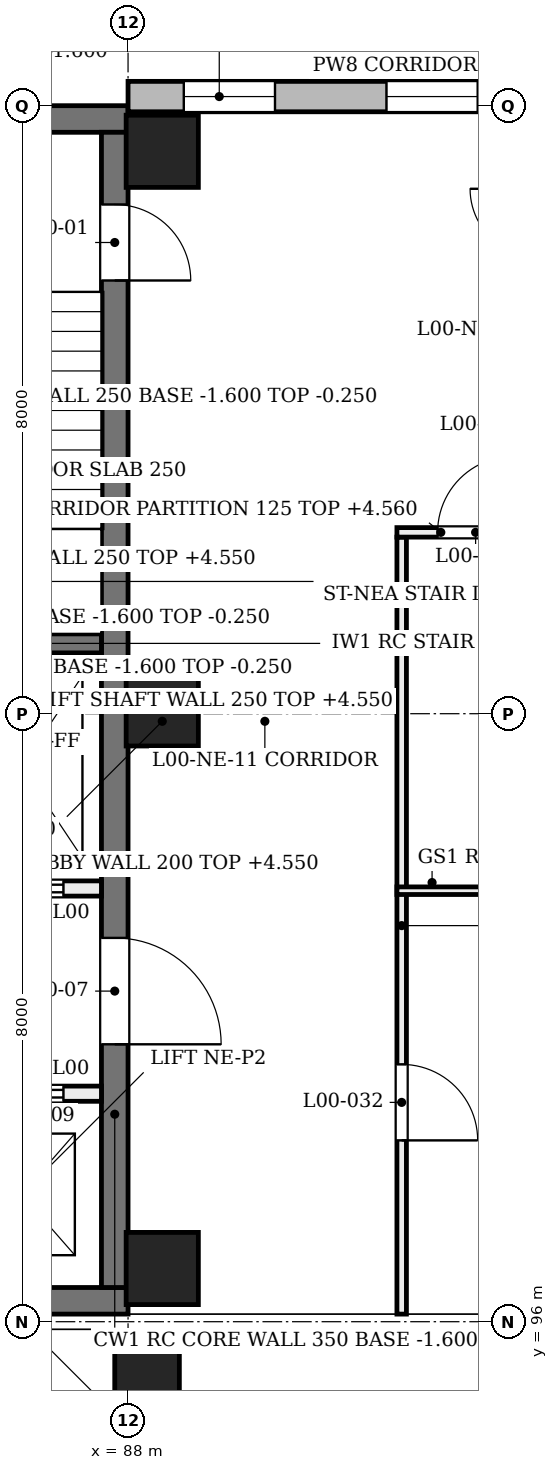
"""IFC4 building model, lengths in metres.
Left out: names, types, materials, properties, quantities, classifications, styles, units other than length and angle.
Written with IfcOpenShell. Run it as: python <this file> out.ifc"""

import sys

from ifc_helpers import new_model, si_unit, direction, frame, frame_2d, origin, origin_2d, place, context, subcontext, project, spatial, rectangle, extrude, element, fill, save


model = new_model("IFC4")
c1 = context("Model", 3, precision=1e-05, world=origin(), true_north=direction((0.0, 1.0)))
c2 = subcontext(c1, "Body", "Model", "MODEL_VIEW")
j1 = project(units=[si_unit("LENGTHUNIT", "METRE"), si_unit("PLANEANGLEUNIT", "RADIAN")], contexts=[c1])
p1 = place(None, origin())
s1 = spatial("IfcSite", under=j1, at=p1, CompositionType="ELEMENT")
p2 = place(p1, origin())
s2 = spatial("IfcBuilding", under=s1, at=p2, CompositionType="ELEMENT")
p3 = place(p2, origin())
s3 = spatial("IfcBuildingStorey", under=s2, at=p3, CompositionType="ELEMENT", Elevation=0.0)
p4 = place(p3, frame((79.725, 96.275, -1.6), z_axis=(0.0, 0.0, 1.0), x_axis=(1.0, 0.0, 0.0)))
e1 = element("IfcWall", 1, at=p4, inside=s3, PredefinedType="SHEAR", context=c2, shape_type="SweptSolid", body=[
    extrude(rectangle(XDim=8.275, YDim=0.35, at=frame_2d((4.137, 0.0))), origin(), (0.0, 0.0, 1.0), 6.18),
])
p5 = place(p3, frame((79.725, 111.825, -1.6), z_axis=(0.0, 0.0, 1.0), x_axis=(1.0, 0.0, 0.0)))
e2 = element("IfcWall", 2, at=p5, inside=s3, PredefinedType="SHEAR", context=c2, shape_type="SweptSolid", body=[
    extrude(rectangle(XDim=8.275, YDim=0.35, at=frame_2d((4.137, 0.0))), origin(), (0.0, 0.0, 1.0), 6.18),
])
p6 = place(p5, frame((5.975, 0.0, 1.6)))
e3 = element("IfcOpeningElement", 3, at=p6, cuts=e2, PredefinedType="OPENING", context=c2, shape_type="SweptSolid", body=[
    extrude(rectangle(XDim=1.0, YDim=2.1, at=frame_2d((0.5, 1.05))), frame((0.0, 0.185, 0.0), z_axis=(0.0, -1.0, 0.0), x_axis=(1.0, 0.0, 0.0)), (0.0, 0.0, 1.0), 0.37),
])
p7 = place(p5, frame((1.675, 0.0, 1.6)))
e4 = element("IfcOpeningElement", 4, at=p7, cuts=e2, PredefinedType="OPENING", context=c2, shape_type="SweptSolid", body=[
    extrude(rectangle(XDim=1.0, YDim=2.1, at=frame_2d((0.5, 1.05))), frame((0.0, 0.185, 0.0), z_axis=(0.0, -1.0, 0.0), x_axis=(1.0, 0.0, 0.0)), (0.0, 0.0, 1.0), 0.37),
])
p8 = place(p3, frame((87.825, 96.45, -1.6), z_axis=(0.0, 0.0, 1.0), x_axis=(0.0, 1.0, 0.0)))
e5 = element("IfcWall", 5, at=p8, inside=s3, PredefinedType="SHEAR", context=c2, shape_type="SweptSolid", body=[
    extrude(rectangle(XDim=15.2, YDim=0.35, at=frame_2d((7.6, 0.0))), origin(), (0.0, 0.0, 1.0), 6.18),
])
p9 = place(p8, frame((13.25, 0.0, 1.6)))
e6 = element("IfcOpeningElement", 6, at=p9, cuts=e5, PredefinedType="OPENING", context=c2, shape_type="SweptSolid", body=[
    extrude(rectangle(XDim=1.0, YDim=2.1, at=frame_2d((0.5, 1.05))), frame((0.0, 0.185, 0.0), z_axis=(0.0, -1.0, 0.0), x_axis=(1.0, 0.0, 0.0)), (0.0, 0.0, 1.0), 0.37),
])
p10 = place(p8, frame((3.2, 0.0, 1.6)))
e7 = element("IfcOpeningElement", 7, at=p10, cuts=e5, PredefinedType="OPENING", context=c2, shape_type="SweptSolid", body=[
    extrude(rectangle(XDim=1.4, YDim=2.1, at=frame_2d((0.7, 1.05))), frame((0.0, 0.185, 0.0), z_axis=(0.0, -1.0, 0.0), x_axis=(1.0, 0.0, 0.0)), (0.0, 0.0, 1.0), 0.37),
])
for number, where, z_axis, x_axis in (
    (8, (88.45, 96.7, -1.6), (0.0, 0.0, 1.0), (1.0, 0.0, 0.0)),
    (9, (88.45, 104.05, -1.6), (0.0, 0.0, 1.0), (1.0, 0.0, 0.0)),
    (10, (88.45, 111.4, -1.6), (0.0, 0.0, 1.0), (1.0, 0.0, 0.0)),
):
    element("IfcColumn", number, at=place(p3, frame(where, z_axis=z_axis, x_axis=x_axis)), inside=s3, PredefinedType="COLUMN", context=c2, shape_type="SweptSolid", body=[
        extrude(rectangle(XDim=0.95, YDim=0.95, at=origin_2d()), origin(), (0.0, 0.0, 1.0), 6.4),
    ])
p11 = place(p3, frame((87.667, 95.3, -1.6), z_axis=(0.203937849881, 0.0, 0.978983837142), x_axis=(0.0, 1.0, 0.0)))
e11 = element("IfcColumn", 11, at=p11, inside=s3, PredefinedType="COLUMN", context=c2, shape_type="SweptSolid", body=[
    extrude(rectangle(XDim=0.85, YDim=0.85, at=origin_2d()), origin(), (0.0, 0.0, 1.0), 6.538),
])
p12 = place(p3, frame((88.0, 112.12, 0.0), z_axis=(0.0, 0.0, 1.0), x_axis=(1.0, 0.0, 0.0)))
e12 = element("IfcWall", 12, at=p12, inside=s3, PredefinedType="SOLIDWALL", context=c2, shape_type="SweptSolid", body=[
    extrude(rectangle(XDim=8.0, YDim=0.4, at=frame_2d((4.0, 0.0))), origin(), (0.0, 0.0, 1.0), 3.9),
])
p13 = place(p12, frame((0.733, 0.0, 1.9)))
e13 = element("IfcOpeningElement", 13, at=p13, cuts=e12, PredefinedType="OPENING", context=c2, shape_type="SweptSolid", body=[
    extrude(rectangle(XDim=1.2, YDim=1.5, at=frame_2d((0.6, 0.75))), frame((0.0, 0.21, 0.0), z_axis=(0.0, -1.0, 0.0), x_axis=(1.0, 0.0, 0.0)), (0.0, 0.0, 1.0), 0.42),
])
p14 = place(p12, frame((3.4, 0.0, 1.9)))
e14 = element("IfcOpeningElement", 14, at=p14, cuts=e12, PredefinedType="OPENING", context=c2, shape_type="SweptSolid", body=[
    extrude(rectangle(XDim=1.2, YDim=1.5, at=frame_2d((0.6, 0.75))), frame((0.0, 0.21, 0.0), z_axis=(0.0, -1.0, 0.0), x_axis=(1.0, 0.0, 0.0)), (0.0, 0.0, 1.0), 0.42),
])
p15 = place(p12, frame((6.067, 0.0, 1.9)))
e15 = element("IfcOpeningElement", 15, at=p15, cuts=e12, PredefinedType="OPENING", context=c2, shape_type="SweptSolid", body=[
    extrude(rectangle(XDim=1.2, YDim=1.5, at=frame_2d((0.6, 0.75))), frame((0.0, 0.21, 0.0), z_axis=(0.0, -1.0, 0.0), x_axis=(1.0, 0.0, 0.0)), (0.0, 0.0, 1.0), 0.42),
])
p16 = place(p3, frame((87.65, 104.925, 0.0), z_axis=(0.0, 0.0, 1.0), x_axis=(-1.0, 0.0, 0.0)))
e16 = element("IfcWall", 16, at=p16, inside=s3, PredefinedType="SOLIDWALL", context=c2, shape_type="SweptSolid", body=[
    extrude(rectangle(XDim=3.1, YDim=0.25, at=frame_2d((1.55, 0.0))), origin(), (0.0, 0.0, 1.0), 4.55),
])
p17 = place(p3, frame((87.65, 104.925, -1.6), z_axis=(0.0, 0.0, 1.0), x_axis=(-1.0, 0.0, 0.0)))
e17 = element("IfcWall", 17, at=p17, inside=s3, PredefinedType="SOLIDWALL", context=c2, shape_type="SweptSolid", body=[
    extrude(rectangle(XDim=3.1, YDim=0.25, at=frame_2d((1.55, 0.0))), origin(), (0.0, 0.0, 1.0), 1.35),
])
p18 = place(p3, frame((87.65, 101.7, 0.0), z_axis=(0.0, 0.0, 1.0), x_axis=(-1.0, 0.0, 0.0)))
e18 = element("IfcWall", 18, at=p18, inside=s3, PredefinedType="SOLIDWALL", context=c2, shape_type="SweptSolid", body=[
    extrude(rectangle(XDim=7.2, YDim=0.2, at=frame_2d((3.6, 0.0))), origin(), (0.0, 0.0, 1.0), 4.55),
])
p19 = place(p18, frame((0.5, 0.0, 0.0)))
e19 = element("IfcOpeningElement", 19, at=p19, cuts=e18, PredefinedType="OPENING", context=c2, shape_type="SweptSolid", body=[
    extrude(rectangle(XDim=1.1, YDim=2.1, at=frame_2d((0.55, 1.05))), frame((0.0, 0.11, 0.0), z_axis=(0.0, -1.0, 0.0), x_axis=(1.0, 0.0, 0.0)), (0.0, 0.0, 1.0), 0.22),
])
p20 = place(p18, frame((5.6, 0.0, 0.0)))
e20 = element("IfcOpeningElement", 20, at=p20, cuts=e18, PredefinedType="OPENING", context=c2, shape_type="SweptSolid", body=[
    extrude(rectangle(XDim=1.1, YDim=2.1, at=frame_2d((0.55, 1.05))), frame((0.0, 0.11, 0.0), z_axis=(0.0, -1.0, 0.0), x_axis=(1.0, 0.0, 0.0)), (0.0, 0.0, 1.0), 0.22),
])
p21 = place(p18, frame((3.1, 0.0, 0.0)))
e21 = element("IfcOpeningElement", 21, at=p21, cuts=e18, PredefinedType="OPENING", context=c2, shape_type="SweptSolid", body=[
    extrude(rectangle(XDim=1.0, YDim=2.1, at=frame_2d((0.5, 1.05))), frame((0.0, 0.11, 0.0), z_axis=(0.0, -1.0, 0.0), x_axis=(1.0, 0.0, 0.0)), (0.0, 0.0, 1.0), 0.22),
])
p22 = place(p3, frame((87.65, 99.0, 0.0), z_axis=(0.0, 0.0, 1.0), x_axis=(-1.0, 0.0, 0.0)))
e22 = element("IfcWall", 22, at=p22, inside=s3, PredefinedType="SOLIDWALL", context=c2, shape_type="SweptSolid", body=[
    extrude(rectangle(XDim=7.2, YDim=0.2, at=frame_2d((3.6, 0.0))), origin(), (0.0, 0.0, 1.0), 4.55),
])
p23 = place(p22, frame((0.5, 0.0, 0.0)))
e23 = element("IfcOpeningElement", 23, at=p23, cuts=e22, PredefinedType="OPENING", context=c2, shape_type="SweptSolid", body=[
    extrude(rectangle(XDim=1.1, YDim=2.1, at=frame_2d((0.55, 1.05))), frame((0.0, 0.11, 0.0), z_axis=(0.0, -1.0, 0.0), x_axis=(1.0, 0.0, 0.0)), (0.0, 0.0, 1.0), 0.22),
])
p24 = place(p22, frame((5.6, 0.0, 0.0)))
e24 = element("IfcOpeningElement", 24, at=p24, cuts=e22, PredefinedType="OPENING", context=c2, shape_type="SweptSolid", body=[
    extrude(rectangle(XDim=1.1, YDim=2.1, at=frame_2d((0.55, 1.05))), frame((0.0, 0.11, 0.0), z_axis=(0.0, -1.0, 0.0), x_axis=(1.0, 0.0, 0.0)), (0.0, 0.0, 1.0), 0.22),
])
p25 = place(p22, frame((3.1, 0.0, 0.0)))
e25 = element("IfcOpeningElement", 25, at=p25, cuts=e22, PredefinedType="OPENING", context=c2, shape_type="SweptSolid", body=[
    extrude(rectangle(XDim=1.0, YDim=2.1, at=frame_2d((0.5, 1.05))), frame((0.0, 0.11, 0.0), z_axis=(0.0, -1.0, 0.0), x_axis=(1.0, 0.0, 0.0)), (0.0, 0.0, 1.0), 0.22),
])
p26 = place(p3, frame((91.6, 96.1, 0.0), z_axis=(0.0, 0.0, 1.0), x_axis=(0.0, 1.0, 0.0)))
e26 = element("IfcWall", 26, at=p26, inside=s3, PredefinedType="PARTITIONING", context=c2, shape_type="SweptSolid", body=[
    extrude(rectangle(XDim=10.223, YDim=0.125, at=frame_2d((5.112, 0.0))), origin(), (0.0, 0.0, 1.0), 3.88),
])
p27 = place(p26, frame((2.286, 0.0, 0.0)))
e27 = element("IfcOpeningElement", 27, at=p27, cuts=e26, PredefinedType="OPENING", context=c2, shape_type="SweptSolid", body=[
    extrude(rectangle(XDim=1.0, YDim=2.1, at=frame_2d((0.5, 1.05))), frame((0.0, 0.073, 0.0), z_axis=(0.0, -1.0, 0.0), x_axis=(1.0, 0.0, 0.0)), (0.0, 0.0, 1.0), 0.145),
])
p28 = place(p3, frame((91.538, 101.671, 0.0), z_axis=(0.0, 0.0, 1.0), x_axis=(1.0, 0.0, 0.0)))
e28 = element("IfcWall", 28, at=p28, inside=s3, PredefinedType="PARTITIONING", context=c2, shape_type="SweptSolid", body=[
    extrude(rectangle(XDim=4.382, YDim=0.1, at=frame_2d((2.191, 0.0))), origin(), (0.0, 0.0, 1.0), 3.88),
])
p29 = place(p3, frame((91.538, 106.386, 0.0), z_axis=(0.0, 0.0, 1.0), x_axis=(1.0, 0.0, 0.0)))
e29 = element("IfcWall", 29, at=p29, inside=s3, PredefinedType="PARTITIONING", context=c2, shape_type="SweptSolid", body=[
    extrude(rectangle(XDim=1.925, YDim=0.125, at=frame_2d((0.962, 0.0))), origin(), (0.0, 0.0, 1.0), 4.56),
])
p30 = place(p29, frame((0.535, 0.0, 0.0)))
e30 = element("IfcOpeningElement", 30, at=p30, cuts=e29, PredefinedType="OPENING", context=c2, shape_type="SweptSolid", body=[
    extrude(rectangle(XDim=1.0, YDim=2.1, at=frame_2d((0.5, 1.05))), frame((0.0, 0.073, 0.0), z_axis=(0.0, -1.0, 0.0), x_axis=(1.0, 0.0, 0.0)), (0.0, 0.0, 1.0), 0.145),
])
p31 = place(p13, origin())
e31 = element("IfcWindow", 31, at=p31, inside=s3, PartitioningType="SINGLE_PANEL", PredefinedType="WINDOW", context=c2, shape_type="SweptSolid", body=[
    extrude(rectangle(XDim=1.2, YDim=1.5, at=frame_2d((0.6, 0.75))), frame((0.0, 0.03, 0.0), z_axis=(0.0, -1.0, 0.0), x_axis=(1.0, 0.0, 0.0)), (0.0, 0.0, 1.0), 0.06),
])
fill(e13, e31)
p32 = place(p14, origin())
e32 = element("IfcWindow", 32, at=p32, inside=s3, PartitioningType="SINGLE_PANEL", PredefinedType="WINDOW", context=c2, shape_type="SweptSolid", body=[
    extrude(rectangle(XDim=1.2, YDim=1.5, at=frame_2d((0.6, 0.75))), frame((0.0, 0.03, 0.0), z_axis=(0.0, -1.0, 0.0), x_axis=(1.0, 0.0, 0.0)), (0.0, 0.0, 1.0), 0.06),
])
fill(e14, e32)
p33 = place(p9, frame((1.0, 0.0, 0.0), z_axis=(0.0, 0.0, 1.0), x_axis=(-1.0, 0.0, 0.0)))
e33 = element("IfcDoor", 33, at=p33, inside=s3, OperationType="SINGLE_SWING_LEFT", PredefinedType="DOOR", context=c2, shape_type="SweptSolid", body=[
    extrude(rectangle(XDim=1.0, YDim=2.1, at=frame_2d((0.5, 1.05))), frame((0.0, 0.025, 0.0), z_axis=(0.0, -1.0, 0.0), x_axis=(1.0, 0.0, 0.0)), (0.0, 0.0, 1.0), 0.05),
])
fill(e6, e33)
p34 = place(p19, origin())
e34 = element("IfcDoor", 34, at=p34, inside=s3, OperationType="DOUBLE_DOOR_SLIDING", PredefinedType="DOOR", context=c2, shape_type="SweptSolid", body=[
    extrude(rectangle(XDim=1.1, YDim=2.1, at=frame_2d((0.55, 1.05))), frame((0.0, 0.025, 0.0), z_axis=(0.0, -1.0, 0.0), x_axis=(1.0, 0.0, 0.0)), (0.0, 0.0, 1.0), 0.05),
])
fill(e19, e34)
p35 = place(p23, frame((1.1, 0.0, 0.0), z_axis=(0.0, 0.0, 1.0), x_axis=(-1.0, 0.0, 0.0)))
e35 = element("IfcDoor", 35, at=p35, inside=s3, OperationType="DOUBLE_DOOR_SLIDING", PredefinedType="DOOR", context=c2, shape_type="SweptSolid", body=[
    extrude(rectangle(XDim=1.1, YDim=2.1, at=frame_2d((0.55, 1.05))), frame((0.0, 0.025, 0.0), z_axis=(0.0, -1.0, 0.0), x_axis=(1.0, 0.0, 0.0)), (0.0, 0.0, 1.0), 0.05),
])
fill(e23, e35)
p36 = place(p10, frame((1.4, 0.0, 0.0), z_axis=(0.0, 0.0, 1.0), x_axis=(-1.0, 0.0, 0.0)))
e36 = element("IfcDoor", 36, at=p36, inside=s3, OperationType="SINGLE_SWING_LEFT", PredefinedType="DOOR", context=c2, shape_type="SweptSolid", body=[
    extrude(rectangle(XDim=1.4, YDim=2.1, at=frame_2d((0.7, 1.05))), frame((0.0, 0.025, 0.0), z_axis=(0.0, -1.0, 0.0), x_axis=(1.0, 0.0, 0.0)), (0.0, 0.0, 1.0), 0.05),
])
fill(e7, e36)
p37 = place(p30, frame((1.0, 0.0, 0.0), z_axis=(0.0, 0.0, 1.0), x_axis=(-1.0, 0.0, 0.0)))
e37 = element("IfcDoor", 37, at=p37, inside=s3, OperationType="SINGLE_SWING_RIGHT", PredefinedType="DOOR", context=c2, shape_type="SweptSolid", body=[
    extrude(rectangle(XDim=1.0, YDim=2.1, at=frame_2d((0.5, 1.05))), frame((0.0, 0.025, 0.0), z_axis=(0.0, -1.0, 0.0), x_axis=(1.0, 0.0, 0.0)), (0.0, 0.0, 1.0), 0.05),
])
fill(e30, e37)
p38 = place(p27, frame((1.0, 0.0, 0.0), z_axis=(0.0, 0.0, 1.0), x_axis=(-1.0, 0.0, 0.0)))
e38 = element("IfcDoor", 38, at=p38, inside=s3, OperationType="SINGLE_SWING_LEFT", PredefinedType="DOOR", context=c2, shape_type="SweptSolid", body=[
    extrude(rectangle(XDim=1.0, YDim=2.1, at=frame_2d((0.5, 1.05))), frame((0.0, 0.025, 0.0), z_axis=(0.0, -1.0, 0.0), x_axis=(1.0, 0.0, 0.0)), (0.0, 0.0, 1.0), 0.05),
])
fill(e27, e38)
save(model, sys.argv[1])
